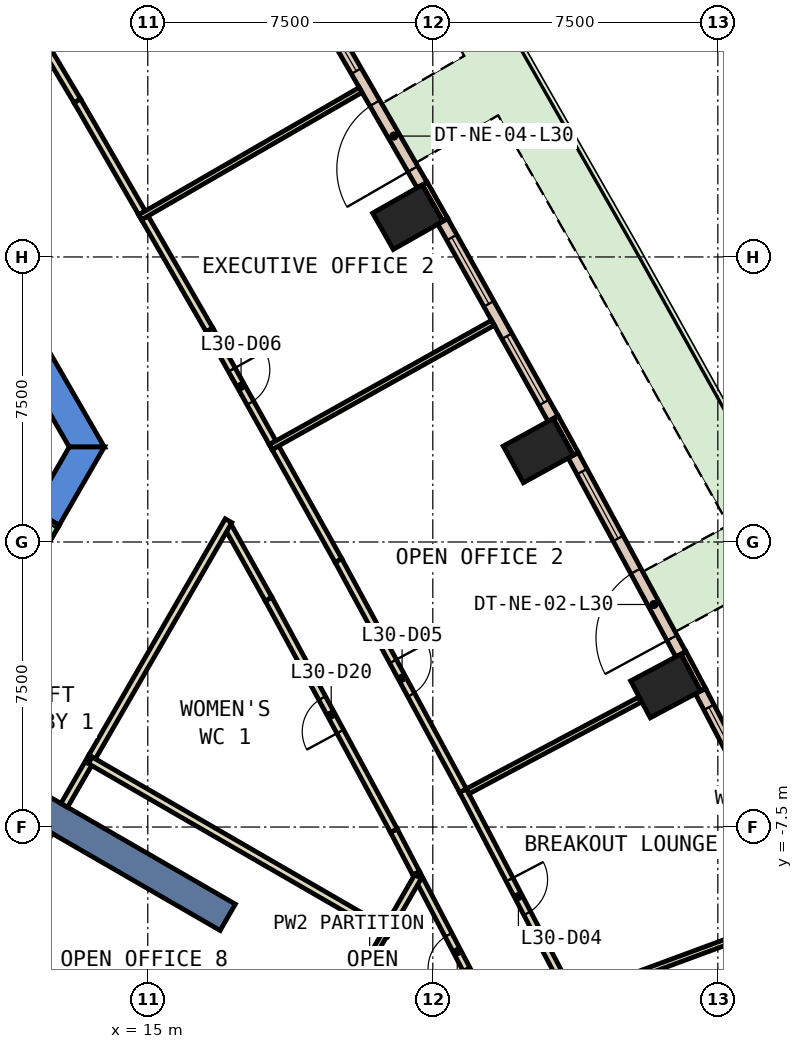
"""IFC4 building model, lengths in metres.
Left out: names, types, materials, properties, quantities, classifications, styles, units other than length and angle.
Written with IfcOpenShell. Run it as: python <this file> out.ifc"""

import sys

from ifc_helpers import new_model, si_unit, direction, frame, frame_2d, origin, origin_2d, place, context, subcontext, project, spatial, polyline, rectangle, outline, extrude, element, fill, save


model = new_model("IFC4")
c1 = context("Model", 3, precision=1e-05, world=origin(), true_north=direction((0.0, 1.0)))
c2 = subcontext(c1, "Body", "Model", "MODEL_VIEW")
j1 = project(units=[si_unit("LENGTHUNIT", "METRE"), si_unit("PLANEANGLEUNIT", "RADIAN")], contexts=[c1])
p1 = place(None, origin())
s1 = spatial("IfcSite", under=j1, at=p1, CompositionType="ELEMENT")
p2 = place(p1, origin())
s2 = spatial("IfcBuilding", under=s1, at=p2, CompositionType="ELEMENT")
p3 = place(p2, frame((0.0, 0.0, 138.2)))
s3 = spatial("IfcBuildingStorey", under=s2, at=p3, CompositionType="ELEMENT", Elevation=138.2)
for number, where, z_axis, x_axis in (
    (1, (28.626, -3.788, 0.0), (0.0, 0.0, 1.0), (-0.47, 0.883, 0.0)),
    (2, (25.275, 2.403, 0.0), (0.0, 0.0, 1.0), (-0.482, 0.876, 0.0)),
    (3, (21.84, 8.546, 0.0), (0.0, 0.0, 1.0), (-0.494, 0.869, 0.0)),
):
    element("IfcColumn", number, at=place(p3, frame(where, z_axis=z_axis, x_axis=x_axis)), inside=s3, PredefinedType="COLUMN", context=c2, shape_type="SweptSolid", body=[
        extrude(rectangle(XDim=1.1, YDim=1.5, at=origin_2d()), origin(), (0.0, 0.0, 1.0), 3.8),
    ])
p4 = place(p3, frame((0.0, 0.0, -0.6)))
e4 = element("IfcWall", 4, at=p4, inside=s3, PredefinedType="SHEAR", context=c2, shape_type="SweptSolid", body=[
    extrude(outline(polyline([(8.517, 11.748), (7.824, 11.348), (12.933, 2.5), (13.856, 2.5), (8.517, 11.748)])), origin(), (0.0, 0.0, 1.0), 4.4),
])
p5 = place(p3, frame((0.0, 0.0, -0.6)))
e5 = element("IfcWall", 5, at=p5, inside=s3, PredefinedType="SHEAR", context=c2, shape_type="SweptSolid", body=[
    extrude(outline(polyline([(11.974, 0.84), (12.667, 0.44), (13.856, 2.5), (12.933, 2.5), (11.974, 0.84)])), origin(), (0.0, 0.0, 1.0), 4.4),
])
p6 = place(p3, frame((0.0, 0.0, 3.6)))
e6 = element("IfcWall", 6, at=p6, inside=s3, PredefinedType="SHEAR", context=c2, shape_type="SweptSolid", body=[
    extrude(outline(polyline([(12.667, 0.44), (11.974, 0.84), (11.324, -0.286), (12.017, -0.686), (12.667, 0.44)])), origin(), (0.0, 0.0, 1.0), 0.2),
])
p7 = place(p3, frame((9.31, -5.375, -0.6), z_axis=(0.0, 0.0, 1.0), x_axis=(0.866017533419, -0.500013631625, 0.0)))
e7 = element("IfcWall", 7, at=p7, inside=s3, PredefinedType="SHEAR", context=c2, shape_type="SweptSolid", body=[
    extrude(rectangle(XDim=9.0, YDim=0.8, at=frame_2d((4.5, 0.0))), origin(), (0.0, 0.0, 1.0), 4.4),
])
for number, where, z_axis, x_axis in (
    (8, (29.612, -3.886, 0.0), (0.0, 0.0, 1.0), (-0.47, 0.883, 0.0)),
    (9, (26.263, 2.319, 0.0), (0.0, 0.0, 1.0), (-0.482, 0.876, 0.0)),
):
    element("IfcWall", number, at=place(p3, frame(where, z_axis=z_axis, x_axis=x_axis)), inside=s3, PredefinedType="STANDARD", context=c2, shape_type="SweptSolid", body=[
        extrude(rectangle(XDim=1.1, YDim=0.15, at=frame_2d((0.55, 0.0))), origin(), (0.0, 0.0, 1.0), 3.8),
    ])
p8 = place(p3, frame((22.83, 8.476, 0.0), z_axis=(0.0, 0.0, 1.0), x_axis=(-0.494775760346, 0.869020682708, 0.0)))
e10 = element("IfcWall", 10, at=p8, inside=s3, PredefinedType="STANDARD", context=c2, shape_type="SweptSolid", body=[
    extrude(rectangle(XDim=1.1, YDim=0.15, at=frame_2d((0.55, 0.0))), origin(), (0.0, 0.0, 1.0), 3.8),
])
p9 = place(p3, frame((32.291, -9.173, 0.0), z_axis=(0.0, 0.0, 1.0), x_axis=(-0.463809970306, 0.885934710599, 0.0)))
e11 = element("IfcWall", 11, at=p9, inside=s3, PredefinedType="STANDARD", context=c2, shape_type="SweptSolid", body=[
    extrude(rectangle(XDim=5.927, YDim=0.3, at=frame_2d((2.963, 0.0))), origin(), (0.0, 0.0, 1.0), 3.8),
])
p10 = place(p9, frame((0.482, 0.0, 0.9)))
e12 = element("IfcOpeningElement", 12, at=p10, cuts=e11, PredefinedType="OPENING", context=c2, shape_type="SweptSolid", body=[
    extrude(rectangle(XDim=2.0, YDim=2.6, at=frame_2d((1.0, 1.3))), frame((0.0, 0.16, 0.0), z_axis=(0.0, -1.0, 0.0), x_axis=(1.0, 0.0, 0.0)), (0.0, 0.0, 1.0), 0.32),
])
p11 = place(p9, frame((3.445, 0.0, 0.9)))
e13 = element("IfcOpeningElement", 13, at=p11, cuts=e11, PredefinedType="OPENING", context=c2, shape_type="SweptSolid", body=[
    extrude(rectangle(XDim=2.0, YDim=2.6, at=frame_2d((1.0, 1.3))), frame((0.0, 0.16, 0.0), z_axis=(0.0, -1.0, 0.0), x_axis=(1.0, 0.0, 0.0)), (0.0, 0.0, 1.0), 0.32),
])
p12 = place(p3, frame((29.026, -2.953, 0.0), z_axis=(0.0, 0.0, 1.0), x_axis=(-0.475794135288, 0.87955667289, 0.0)))
e14 = element("IfcWall", 14, at=p12, inside=s3, PredefinedType="STANDARD", context=c2, shape_type="SweptSolid", body=[
    extrude(rectangle(XDim=5.952, YDim=0.3, at=frame_2d((2.976, 0.0))), origin(), (0.0, 0.0, 1.0), 3.8),
])
p13 = place(p12, frame((0.488, 0.0, 0.0)))
e15 = element("IfcOpeningElement", 15, at=p13, cuts=e14, PredefinedType="OPENING", context=c2, shape_type="SweptSolid", body=[
    extrude(rectangle(XDim=2.0, YDim=2.4, at=frame_2d((1.0, 1.2))), frame((0.0, 0.16, 0.0), z_axis=(0.0, -1.0, 0.0), x_axis=(1.0, 0.0, 0.0)), (0.0, 0.0, 1.0), 0.32),
])
p14 = place(p12, frame((3.464, 0.0, 0.9)))
e16 = element("IfcOpeningElement", 16, at=p14, cuts=e14, PredefinedType="OPENING", context=c2, shape_type="SweptSolid", body=[
    extrude(rectangle(XDim=2.0, YDim=2.6, at=frame_2d((1.0, 1.3))), frame((0.0, 0.16, 0.0), z_axis=(0.0, -1.0, 0.0), x_axis=(1.0, 0.0, 0.0)), (0.0, 0.0, 1.0), 0.32),
])
p15 = place(p3, frame((25.665, 3.244, 0.0), z_axis=(0.0, 0.0, 1.0), x_axis=(-0.488009846284, 0.872838123555, 0.0)))
e17 = element("IfcWall", 17, at=p15, inside=s3, PredefinedType="STANDARD", context=c2, shape_type="SweptSolid", body=[
    extrude(rectangle(XDim=5.951, YDim=0.3, at=frame_2d((2.976, 0.0))), origin(), (0.0, 0.0, 1.0), 3.8),
])
p16 = place(p15, frame((0.488, 0.0, 0.9)))
e18 = element("IfcOpeningElement", 18, at=p16, cuts=e17, PredefinedType="OPENING", context=c2, shape_type="SweptSolid", body=[
    extrude(rectangle(XDim=2.0, YDim=2.6, at=frame_2d((1.0, 1.3))), frame((0.0, 0.16, 0.0), z_axis=(0.0, -1.0, 0.0), x_axis=(1.0, 0.0, 0.0)), (0.0, 0.0, 1.0), 0.32),
])
p17 = place(p15, frame((3.463, 0.0, 0.9)))
e19 = element("IfcOpeningElement", 19, at=p17, cuts=e17, PredefinedType="OPENING", context=c2, shape_type="SweptSolid", body=[
    extrude(rectangle(XDim=2.0, YDim=2.6, at=frame_2d((1.0, 1.3))), frame((0.0, 0.16, 0.0), z_axis=(0.0, -1.0, 0.0), x_axis=(1.0, 0.0, 0.0)), (0.0, 0.0, 1.0), 0.32),
])
p18 = place(p3, frame((22.218, 9.392, 0.0), z_axis=(0.0, 0.0, 1.0), x_axis=(-0.49994263896, 0.866058518664, 0.0)))
e20 = element("IfcWall", 20, at=p18, inside=s3, PredefinedType="STANDARD", context=c2, shape_type="SweptSolid", body=[
    extrude(rectangle(XDim=5.951, YDim=0.3, at=frame_2d((2.976, 0.0))), origin(), (0.0, 0.0, 1.0), 3.8),
])
p19 = place(p18, frame((0.488, 0.0, 0.0)))
e21 = element("IfcOpeningElement", 21, at=p19, cuts=e20, PredefinedType="OPENING", context=c2, shape_type="SweptSolid", body=[
    extrude(rectangle(XDim=2.0, YDim=2.4, at=frame_2d((1.0, 1.2))), frame((0.0, 0.16, 0.0), z_axis=(0.0, -1.0, 0.0), x_axis=(1.0, 0.0, 0.0)), (0.0, 0.0, 1.0), 0.32),
])
p20 = place(p18, frame((3.463, 0.0, 0.9)))
e22 = element("IfcOpeningElement", 22, at=p20, cuts=e20, PredefinedType="OPENING", context=c2, shape_type="SweptSolid", body=[
    extrude(rectangle(XDim=2.0, YDim=2.6, at=frame_2d((1.0, 1.3))), frame((0.0, 0.16, 0.0), z_axis=(0.0, -1.0, 0.0), x_axis=(1.0, 0.0, 0.0)), (0.0, 0.0, 1.0), 0.32),
])
p21 = place(p3, frame((22.063, -8.717, 0.0), z_axis=(0.0, 0.0, 1.0), x_axis=(-0.463776683525, 0.885952136302, 0.0)))
e23 = element("IfcWall", 23, at=p21, inside=s3, PredefinedType="PARTITIONING", context=c2, shape_type="SweptSolid", body=[
    extrude(rectangle(XDim=1.268, YDim=0.2, at=frame_2d((0.634, 0.0))), origin(), (0.0, 0.0, 1.0), 3.8),
])
p22 = place(p3, frame((21.475, -7.594, 0.0), z_axis=(0.0, 0.0, 1.0), x_axis=(-0.475918691018, 0.879489283357, 0.0)))
e24 = element("IfcWall", 24, at=p22, inside=s3, PredefinedType="PARTITIONING", context=c2, shape_type="SweptSolid", body=[
    extrude(rectangle(XDim=6.928, YDim=0.2, at=frame_2d((3.464, 0.0))), origin(), (0.0, 0.0, 1.0), 3.8),
])
p23 = place(p22, frame((2.964, 0.0, 0.0)))
e25 = element("IfcOpeningElement", 25, at=p23, cuts=e24, PredefinedType="OPENING", context=c2, shape_type="SweptSolid", body=[
    extrude(rectangle(XDim=1.0, YDim=2.1, at=frame_2d((0.5, 1.05))), frame((0.0, 0.11, 0.0), z_axis=(0.0, -1.0, 0.0), x_axis=(1.0, 0.0, 0.0)), (0.0, 0.0, 1.0), 0.22),
])
p24 = place(p3, frame((18.178, -1.501, 0.0), z_axis=(0.0, 0.0, 1.0), x_axis=(-0.487980809747, 0.872854357449, 0.0)))
e26 = element("IfcWall", 26, at=p24, inside=s3, PredefinedType="PARTITIONING", context=c2, shape_type="SweptSolid", body=[
    extrude(rectangle(XDim=2.162, YDim=0.2, at=frame_2d((1.081, 0.0))), origin(), (0.0, 0.0, 1.0), 3.8),
])
p25 = place(p3, frame((24.224, -12.845, 0.0), z_axis=(0.0, 0.0, 1.0), x_axis=(-0.463819025987, 0.885929969655, 0.0)))
e27 = element("IfcWall", 27, at=p25, inside=s3, PredefinedType="PARTITIONING", context=c2, shape_type="SweptSolid", body=[
    extrude(rectangle(XDim=4.659, YDim=0.2, at=frame_2d((2.33, 0.0))), origin(), (0.0, 0.0, 1.0), 3.8),
])
p26 = place(p25, frame((1.83, 0.0, 0.0)))
e28 = element("IfcOpeningElement", 28, at=p26, cuts=e27, PredefinedType="OPENING", context=c2, shape_type="SweptSolid", body=[
    extrude(rectangle(XDim=1.0, YDim=2.1, at=frame_2d((0.5, 1.05))), frame((0.0, 0.11, 0.0), z_axis=(0.0, -1.0, 0.0), x_axis=(1.0, 0.0, 0.0)), (0.0, 0.0, 1.0), 0.22),
])
p27 = place(p3, frame((23.294, -6.541, 0.0), z_axis=(0.0, 0.0, 1.0), x_axis=(0.463802391881, -0.885938678062, 0.0)))
e29 = element("IfcWall", 29, at=p27, inside=s3, PredefinedType="PARTITIONING", context=c2, shape_type="SweptSolid", body=[
    extrude(rectangle(XDim=6.287, YDim=0.2, at=frame_2d((3.144, 0.0))), origin(), (0.0, 0.0, 1.0), 3.8),
])
p28 = place(p27, frame((2.644, 0.0, 0.0)))
e30 = element("IfcOpeningElement", 30, at=p28, cuts=e29, PredefinedType="OPENING", context=c2, shape_type="SweptSolid", body=[
    extrude(rectangle(XDim=1.0, YDim=2.1, at=frame_2d((0.5, 1.05))), frame((0.0, 0.11, 0.0), z_axis=(0.0, -1.0, 0.0), x_axis=(1.0, 0.0, 0.0)), (0.0, 0.0, 1.0), 0.22),
])
p29 = place(p3, frame((18.358, 2.481, 0.0), z_axis=(0.0, 0.0, 1.0), x_axis=(0.48792588674, -0.872885060617, 0.0)))
e31 = element("IfcWall", 31, at=p29, inside=s3, PredefinedType="PARTITIONING", context=c2, shape_type="SweptSolid", body=[
    extrude(rectangle(XDim=3.403, YDim=0.2, at=frame_2d((1.701, 0.0))), origin(), (0.0, 0.0, 1.0), 3.8),
])
p30 = place(p3, frame((20.018, -0.489, 0.0), z_axis=(0.0, 0.0, 1.0), x_axis=(0.476025981828, -0.87943121654, 0.0)))
e32 = element("IfcWall", 32, at=p30, inside=s3, PredefinedType="PARTITIONING", context=c2, shape_type="SweptSolid", body=[
    extrude(rectangle(XDim=6.882, YDim=0.2, at=frame_2d((3.441, 0.0))), origin(), (0.0, 0.0, 1.0), 3.8),
])
p31 = place(p30, frame((3.016, 0.0, 0.0)))
e33 = element("IfcOpeningElement", 33, at=p31, cuts=e32, PredefinedType="OPENING", context=c2, shape_type="SweptSolid", body=[
    extrude(rectangle(XDim=1.0, YDim=2.1, at=frame_2d((0.5, 1.05))), frame((0.0, 0.11, 0.0), z_axis=(0.0, -1.0, 0.0), x_axis=(1.0, 0.0, 0.0)), (0.0, 0.0, 1.0), 0.22),
])
p32 = place(p3, frame((14.922, 8.529, 0.0), z_axis=(0.0, 0.0, 1.0), x_axis=(0.500097109062, -0.865969330582, 0.0)))
e34 = element("IfcWall", 34, at=p32, inside=s3, PredefinedType="PARTITIONING", context=c2, shape_type="SweptSolid", body=[
    extrude(rectangle(XDim=3.403, YDim=0.2, at=frame_2d((1.702, 0.0))), origin(), (0.0, 0.0, 1.0), 3.8),
])
p33 = place(p3, frame((16.624, 5.582, 0.0), z_axis=(0.0, 0.0, 1.0), x_axis=(0.487871212611, -0.872915620152, 0.0)))
e35 = element("IfcWall", 35, at=p33, inside=s3, PredefinedType="PARTITIONING", context=c2, shape_type="SweptSolid", body=[
    extrude(rectangle(XDim=3.402, YDim=0.2, at=frame_2d((1.701, 0.0))), origin(), (0.0, 0.0, 1.0), 3.8),
])
p34 = place(p33, frame((1.202, 0.0, 0.0)))
e36 = element("IfcOpeningElement", 36, at=p34, cuts=e35, PredefinedType="OPENING", context=c2, shape_type="SweptSolid", body=[
    extrude(rectangle(XDim=1.0, YDim=2.1, at=frame_2d((0.5, 1.05))), frame((0.0, 0.11, 0.0), z_axis=(0.0, -1.0, 0.0), x_axis=(1.0, 0.0, 0.0)), (0.0, 0.0, 1.0), 0.22),
])
p35 = place(p3, frame((9.548, 17.645, 0.0), z_axis=(0.0, 0.0, 1.0), x_axis=(0.511822081848, -0.859091471575, 0.0)))
e37 = element("IfcWall", 37, at=p35, inside=s3, PredefinedType="PARTITIONING", context=c2, shape_type="SweptSolid", body=[
    extrude(rectangle(XDim=7.03, YDim=0.2, at=frame_2d((3.515, 0.0))), origin(), (0.0, 0.0, 1.0), 3.8),
])
p36 = place(p35, frame((3.015, 0.0, 0.0)))
e38 = element("IfcOpeningElement", 38, at=p36, cuts=e37, PredefinedType="OPENING", context=c2, shape_type="SweptSolid", body=[
    extrude(rectangle(XDim=1.0, YDim=2.1, at=frame_2d((0.5, 1.05))), frame((0.0, 0.11, 0.0), z_axis=(0.0, -1.0, 0.0), x_axis=(1.0, 0.0, 0.0)), (0.0, 0.0, 1.0), 0.22),
])
p37 = place(p3, frame((13.146, 11.606, 0.0), z_axis=(0.0, 0.0, 1.0), x_axis=(0.499881871653, -0.866093594476, 0.0)))
e39 = element("IfcWall", 39, at=p37, inside=s3, PredefinedType="PARTITIONING", context=c2, shape_type="SweptSolid", body=[
    extrude(rectangle(XDim=3.403, YDim=0.2, at=frame_2d((1.701, 0.0))), origin(), (0.0, 0.0, 1.0), 3.8),
])
p38 = place(p3, frame((13.535, -5.657, 0.0), z_axis=(0.0, 0.0, 1.0), x_axis=(-0.499751238113, -0.866168978898, 0.0)))
e40 = element("IfcWall", 40, at=p38, inside=s3, PredefinedType="PARTITIONING", context=c2, shape_type="SweptSolid", body=[
    extrude(rectangle(XDim=1.469, YDim=0.2, at=frame_2d((0.734, 0.0))), origin(), (0.0, 0.0, 1.0), 3.8),
])
p39 = place(p3, frame((17.124, 0.56, 0.0), z_axis=(0.0, 0.0, 1.0), x_axis=(-0.49996876383, -0.866043437245, 0.0)))
e41 = element("IfcWall", 41, at=p39, inside=s3, PredefinedType="PARTITIONING", context=c2, shape_type="SweptSolid", body=[
    extrude(rectangle(XDim=7.179, YDim=0.2, at=frame_2d((3.589, 0.0))), origin(), (0.0, 0.0, 1.0), 3.8),
])
p40 = place(p3, frame((13.485, -5.744, 0.0), z_axis=(0.0, 0.0, 1.0), x_axis=(0.865950545648, -0.500129635687, 0.0)))
e42 = element("IfcWall", 42, at=p40, inside=s3, PredefinedType="PARTITIONING", context=c2, shape_type="SweptSolid", body=[
    extrude(rectangle(XDim=9.1, YDim=0.2, at=frame_2d((4.55, 0.0))), origin(), (0.0, 0.0, 1.0), 3.8),
])
p41 = place(p3, frame((21.228, -10.331, 0.0), z_axis=(0.0, 0.0, 1.0), x_axis=(-0.499920861661, -0.866071089505, 0.0)))
e43 = element("IfcWall", 43, at=p41, inside=s3, PredefinedType="PARTITIONING", context=c2, shape_type="SweptSolid", body=[
    extrude(rectangle(XDim=1.562, YDim=0.15, at=frame_2d((0.781, 0.0))), origin(), (0.0, 0.0, 1.0), 3.8),
])
p42 = place(p3, frame((22.109, -8.805, 0.0), z_axis=(0.0, 0.0, 1.0), x_axis=(-0.499920861661, -0.866071089505, 0.0)))
e44 = element("IfcWall", 44, at=p42, inside=s3, PredefinedType="PARTITIONING", context=c2, shape_type="SweptSolid", body=[
    extrude(rectangle(XDim=1.562, YDim=0.2, at=frame_2d((0.781, 0.0))), origin(), (0.0, 0.0, 1.0), 3.8),
])
p43 = place(p3, frame((26.164, -12.023, 0.0), z_axis=(0.0, 0.0, 1.0), x_axis=(0.937995804261, 0.346646608505, 0.0)))
e45 = element("IfcWall", 45, at=p43, inside=s3, PredefinedType="PARTITIONING", context=c2, shape_type="SweptSolid", body=[
    extrude(rectangle(XDim=5.288, YDim=0.15, at=frame_2d((2.644, 0.0))), origin(), (0.0, 0.0, 1.0), 3.8),
])
p44 = place(p3, frame((23.417, -6.56, 0.0), z_axis=(0.0, 0.0, 1.0), x_axis=(0.882784638588, 0.469777906967, 0.0)))
e46 = element("IfcWall", 46, at=p44, inside=s3, PredefinedType="PARTITIONING", context=c2, shape_type="SweptSolid", body=[
    extrude(rectangle(XDim=5.13, YDim=0.15, at=frame_2d((2.565, 0.0))), origin(), (0.0, 0.0, 1.0), 3.8),
])
p45 = place(p3, frame((18.234, 2.497, 0.0), z_axis=(0.0, 0.0, 1.0), x_axis=(0.872820235044, 0.4880418397, 0.0)))
e47 = element("IfcWall", 47, at=p45, inside=s3, PredefinedType="PARTITIONING", context=c2, shape_type="SweptSolid", body=[
    extrude(rectangle(XDim=6.7, YDim=0.15, at=frame_2d((3.35, 0.0))), origin(), (0.0, 0.0, 1.0), 3.8),
])
p46 = place(p3, frame((14.798, 8.544, 0.0), z_axis=(0.0, 0.0, 1.0), x_axis=(0.866041788654, 0.4999716195, 0.0)))
e48 = element("IfcWall", 48, at=p46, inside=s3, PredefinedType="PARTITIONING", context=c2, shape_type="SweptSolid", body=[
    extrude(rectangle(XDim=6.701, YDim=0.15, at=frame_2d((3.35, 0.0))), origin(), (0.0, 0.0, 1.0), 3.8),
])
p47 = place(p3, frame((12.401, -7.621, 0.0), z_axis=(0.0, 0.0, 1.0), x_axis=(-0.499964151829, -0.866046099747, 0.0)))
e49 = element("IfcWall", 49, at=p47, inside=s3, PredefinedType="PARTITIONING", context=c2, shape_type="SweptSolid", body=[
    extrude(rectangle(XDim=8.656, YDim=0.2, at=frame_2d((4.328, 0.0))), origin(), (0.0, 0.0, 1.0), 3.8),
])
p48 = place(p47, frame((2.694, 0.0, 0.0)))
e50 = element("IfcOpeningElement", 50, at=p48, cuts=e49, PredefinedType="OPENING", context=c2, shape_type="SweptSolid", body=[
    extrude(rectangle(XDim=1.0, YDim=2.1, at=frame_2d((0.5, 1.05))), frame((0.0, 0.11, 0.0), z_axis=(0.0, -1.0, 0.0), x_axis=(1.0, 0.0, 0.0)), (0.0, 0.0, 1.0), 0.22),
])
p49 = place(p47, frame((3.794, 0.0, 0.0)))
e51 = element("IfcOpeningElement", 51, at=p49, cuts=e49, PredefinedType="OPENING", context=c2, shape_type="SweptSolid", body=[
    extrude(rectangle(XDim=1.0, YDim=2.1, at=frame_2d((0.5, 1.05))), frame((0.0, 0.11, 0.0), z_axis=(0.0, -1.0, 0.0), x_axis=(1.0, 0.0, 0.0)), (0.0, 0.0, 1.0), 0.22),
])
p50 = place(p3, frame((11.498, -0.385, 0.0), z_axis=(0.0, 0.0, 1.0), x_axis=(0.500221244143, 0.865897630733, 0.0)))
e52 = element("IfcWall", 52, at=p50, inside=s3, PredefinedType="STANDARD", context=c2, shape_type="SweptSolid", body=[
    extrude(rectangle(XDim=1.299, YDim=1.2, at=frame_2d((0.65, 0.0))), origin(), (0.0, 0.0, 1.0), 2.4),
])
p51 = place(p50, frame((0.1, 0.0, 0.0)))
e53 = element("IfcOpeningElement", 53, at=p51, cuts=e52, PredefinedType="OPENING", context=c2, shape_type="SweptSolid", body=[
    extrude(rectangle(XDim=1.1, YDim=2.3, at=frame_2d((0.55, 1.15))), frame((0.0, 0.61, 0.0), z_axis=(0.0, -1.0, 0.0), x_axis=(1.0, 0.0, 0.0)), (0.0, 0.0, 1.0), 1.22),
])
p52 = place(p11, origin())
e54 = element("IfcWindow", 54, at=p52, inside=s3, PartitioningType="SINGLE_PANEL", PredefinedType="WINDOW", context=c2, shape_type="SweptSolid", body=[
    extrude(rectangle(XDim=2.0, YDim=2.6, at=frame_2d((1.0, 1.3))), frame((0.0, 0.03, 0.0), z_axis=(0.0, -1.0, 0.0), x_axis=(1.0, 0.0, 0.0)), (0.0, 0.0, 1.0), 0.06),
])
fill(e13, e54)
p53 = place(p13, origin())
e55 = element("IfcDoor", 55, at=p53, inside=s3, OperationType="SLIDING_TO_LEFT", PredefinedType="DOOR", context=c2, shape_type="SweptSolid", body=[
    extrude(rectangle(XDim=2.0, YDim=2.4, at=frame_2d((1.0, 1.2))), frame((0.0, 0.025, 0.0), z_axis=(0.0, -1.0, 0.0), x_axis=(1.0, 0.0, 0.0)), (0.0, 0.0, 1.0), 0.05),
])
fill(e15, e55)
p54 = place(p14, origin())
e56 = element("IfcWindow", 56, at=p54, inside=s3, PartitioningType="SINGLE_PANEL", PredefinedType="WINDOW", context=c2, shape_type="SweptSolid", body=[
    extrude(rectangle(XDim=2.0, YDim=2.6, at=frame_2d((1.0, 1.3))), frame((0.0, 0.03, 0.0), z_axis=(0.0, -1.0, 0.0), x_axis=(1.0, 0.0, 0.0)), (0.0, 0.0, 1.0), 0.06),
])
fill(e16, e56)
p55 = place(p16, origin())
e57 = element("IfcWindow", 57, at=p55, inside=s3, PartitioningType="SINGLE_PANEL", PredefinedType="WINDOW", context=c2, shape_type="SweptSolid", body=[
    extrude(rectangle(XDim=2.0, YDim=2.6, at=frame_2d((1.0, 1.3))), frame((0.0, 0.03, 0.0), z_axis=(0.0, -1.0, 0.0), x_axis=(1.0, 0.0, 0.0)), (0.0, 0.0, 1.0), 0.06),
])
fill(e18, e57)
p56 = place(p17, origin())
e58 = element("IfcWindow", 58, at=p56, inside=s3, PartitioningType="SINGLE_PANEL", PredefinedType="WINDOW", context=c2, shape_type="SweptSolid", body=[
    extrude(rectangle(XDim=2.0, YDim=2.6, at=frame_2d((1.0, 1.3))), frame((0.0, 0.03, 0.0), z_axis=(0.0, -1.0, 0.0), x_axis=(1.0, 0.0, 0.0)), (0.0, 0.0, 1.0), 0.06),
])
fill(e19, e58)
p57 = place(p19, origin())
e59 = element("IfcDoor", 59, at=p57, inside=s3, OperationType="SLIDING_TO_LEFT", PredefinedType="DOOR", context=c2, shape_type="SweptSolid", body=[
    extrude(rectangle(XDim=2.0, YDim=2.4, at=frame_2d((1.0, 1.2))), frame((0.0, 0.025, 0.0), z_axis=(0.0, -1.0, 0.0), x_axis=(1.0, 0.0, 0.0)), (0.0, 0.0, 1.0), 0.05),
])
fill(e21, e59)
p58 = place(p20, origin())
e60 = element("IfcWindow", 60, at=p58, inside=s3, PartitioningType="SINGLE_PANEL", PredefinedType="WINDOW", context=c2, shape_type="SweptSolid", body=[
    extrude(rectangle(XDim=2.0, YDim=2.6, at=frame_2d((1.0, 1.3))), frame((0.0, 0.03, 0.0), z_axis=(0.0, -1.0, 0.0), x_axis=(1.0, 0.0, 0.0)), (0.0, 0.0, 1.0), 0.06),
])
fill(e22, e60)
p59 = place(p28, origin())
e61 = element("IfcDoor", 61, at=p59, inside=s3, OperationType="SINGLE_SWING_LEFT", PredefinedType="DOOR", context=c2, shape_type="SweptSolid", body=[
    extrude(rectangle(XDim=1.0, YDim=2.1, at=frame_2d((0.5, 1.05))), frame((0.0, 0.025, 0.0), z_axis=(0.0, -1.0, 0.0), x_axis=(1.0, 0.0, 0.0)), (0.0, 0.0, 1.0), 0.05),
])
fill(e30, e61)
p60 = place(p31, origin())
e62 = element("IfcDoor", 62, at=p60, inside=s3, OperationType="SINGLE_SWING_LEFT", PredefinedType="DOOR", context=c2, shape_type="SweptSolid", body=[
    extrude(rectangle(XDim=1.0, YDim=2.1, at=frame_2d((0.5, 1.05))), frame((0.0, 0.025, 0.0), z_axis=(0.0, -1.0, 0.0), x_axis=(1.0, 0.0, 0.0)), (0.0, 0.0, 1.0), 0.05),
])
fill(e33, e62)
p61 = place(p34, origin())
e63 = element("IfcDoor", 63, at=p61, inside=s3, OperationType="SINGLE_SWING_LEFT", PredefinedType="DOOR", context=c2, shape_type="SweptSolid", body=[
    extrude(rectangle(XDim=1.0, YDim=2.1, at=frame_2d((0.5, 1.05))), frame((0.0, 0.025, 0.0), z_axis=(0.0, -1.0, 0.0), x_axis=(1.0, 0.0, 0.0)), (0.0, 0.0, 1.0), 0.05),
])
fill(e36, e63)
p62 = place(p23, origin())
e64 = element("IfcDoor", 64, at=p62, inside=s3, OperationType="SINGLE_SWING_LEFT", PredefinedType="DOOR", context=c2, shape_type="SweptSolid", body=[
    extrude(rectangle(XDim=1.0, YDim=2.1, at=frame_2d((0.5, 1.05))), frame((0.0, 0.025, 0.0), z_axis=(0.0, -1.0, 0.0), x_axis=(1.0, 0.0, 0.0)), (0.0, 0.0, 1.0), 0.05),
])
fill(e25, e64)
p63 = place(p26, origin())
e65 = element("IfcDoor", 65, at=p63, inside=s3, OperationType="SINGLE_SWING_LEFT", PredefinedType="DOOR", context=c2, shape_type="SweptSolid", body=[
    extrude(rectangle(XDim=1.0, YDim=2.1, at=frame_2d((0.5, 1.05))), frame((0.0, 0.025, 0.0), z_axis=(0.0, -1.0, 0.0), x_axis=(1.0, 0.0, 0.0)), (0.0, 0.0, 1.0), 0.05),
])
fill(e28, e65)
save(model, sys.argv[1])
